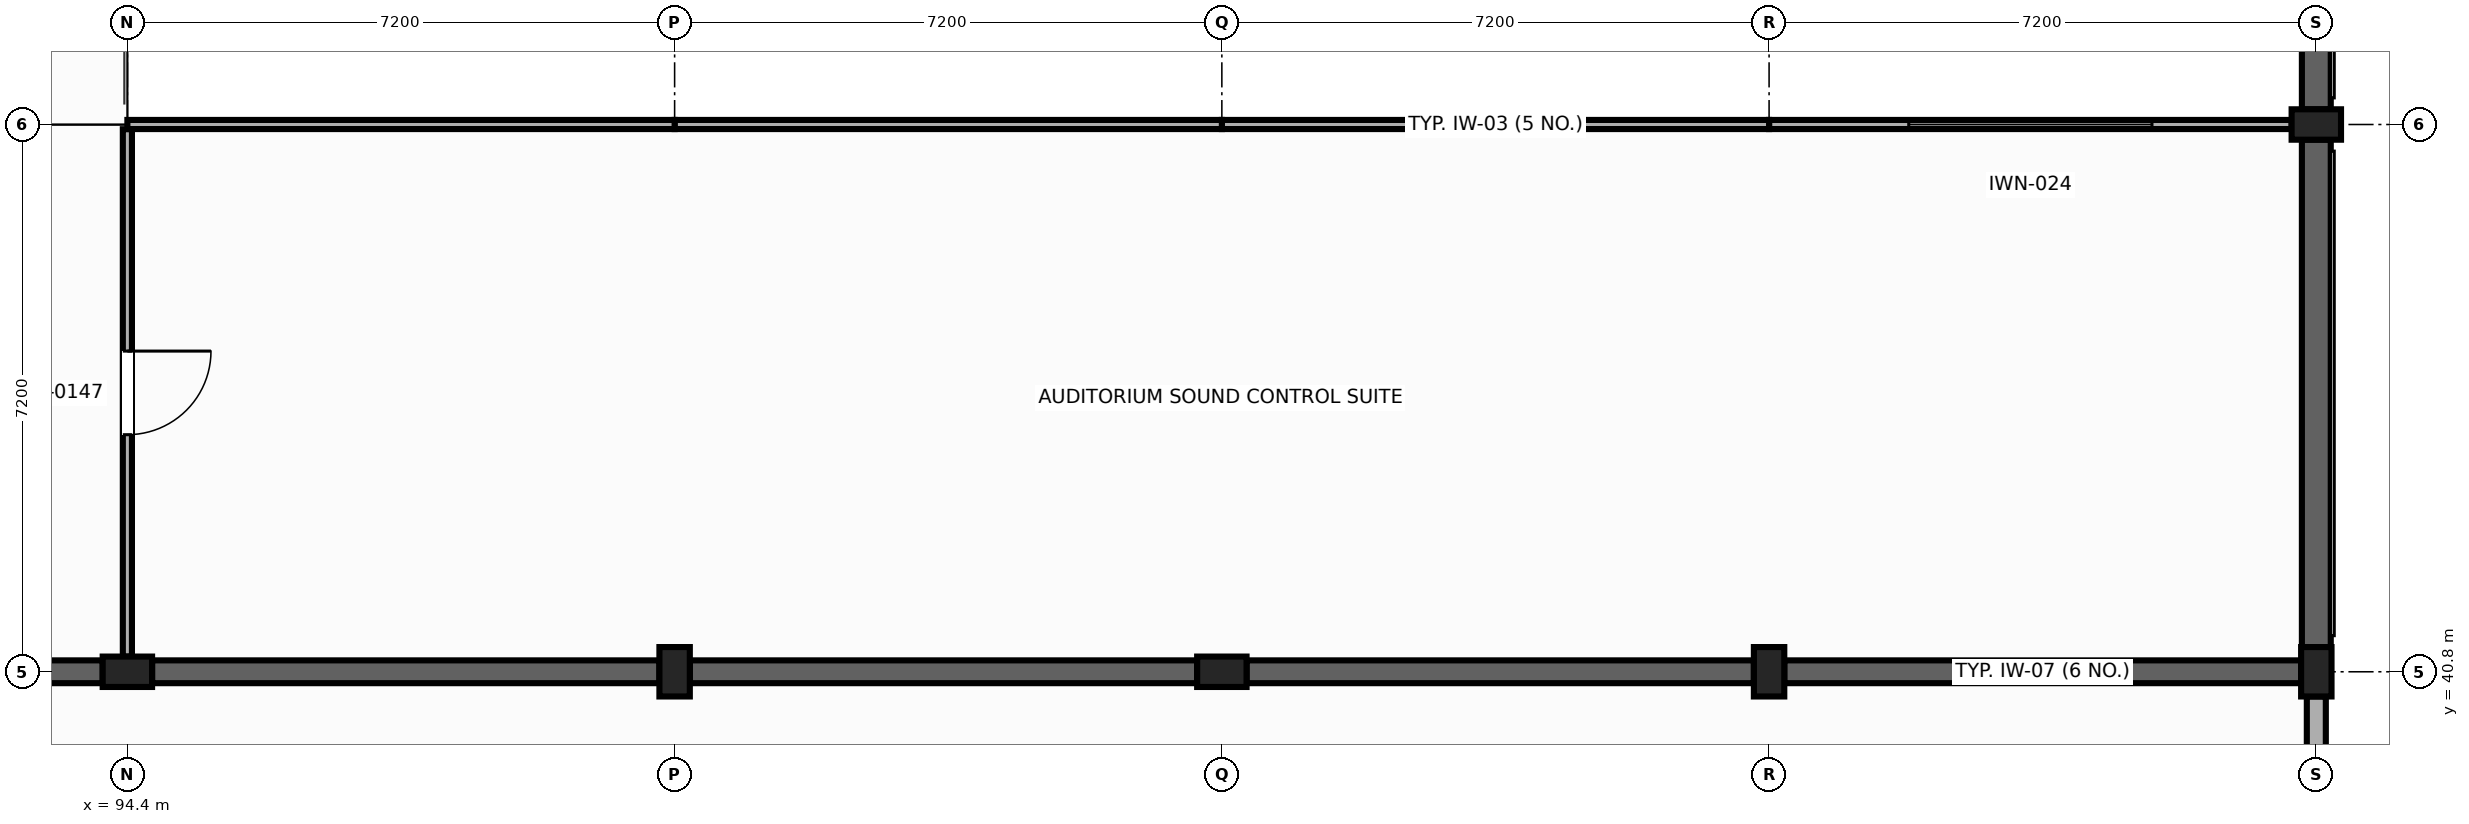
"""IFC4 building model, lengths in metres.
Left out: names, types, materials, properties, quantities, classifications, styles, units other than length and angle.
Written with IfcOpenShell. Run it as: python <this file> out.ifc"""

import sys

from ifc_helpers import new_model, si_unit, direction, frame, frame_2d, origin, origin_2d, place, context, subcontext, project, spatial, rectangle, extrude, element, fill, save


model = new_model("IFC4")
c1 = context("Model", 3, precision=1e-05, world=origin(), true_north=direction((0.0, 1.0)))
c2 = subcontext(c1, "Body", "Model", "MODEL_VIEW")
j1 = project(units=[si_unit("LENGTHUNIT", "METRE"), si_unit("PLANEANGLEUNIT", "RADIAN")], contexts=[c1])
p1 = place(None, origin())
s1 = spatial("IfcSite", under=j1, at=p1, CompositionType="ELEMENT")
p2 = place(p1, origin())
s2 = spatial("IfcBuilding", under=s1, at=p2, CompositionType="ELEMENT")
p3 = place(p2, frame((0.0, 0.0, 14.4)))
s3 = spatial("IfcBuildingStorey", under=s2, at=p3, CompositionType="ELEMENT", Elevation=14.4)
for number, where, z_axis, x_axis in (
    (1, (94.4, 40.8, 0.0), (0.0, 0.0, 1.0), (0.0, 1.0, 0.0)),
    (2, (101.6, 40.8, 0.0), (0.0, 0.0, 1.0), (1.0, 0.0, 0.0)),
    (3, (108.8, 40.8, 0.0), (0.0, 0.0, 1.0), (0.0, 1.0, 0.0)),
    (4, (116.0, 40.8, 0.0), (0.0, 0.0, 1.0), (1.0, 0.0, 0.0)),
):
    element("IfcColumn", number, at=place(p3, frame(where, z_axis=z_axis, x_axis=x_axis)), inside=s3, PredefinedType="PILASTER", context=c2, shape_type="SweptSolid", body=[
        extrude(rectangle(XDim=0.4, YDim=0.65, at=origin_2d()), origin(), (0.0, 0.0, 1.0), 4.28),
    ])
for number, where, z_axis, x_axis in (
    (5, (123.2, 40.8, 0.0), (0.0, 0.0, 1.0), (1.0, 0.0, 0.0)),
    (6, (123.2, 48.0, 0.0), (0.0, 0.0, 1.0), (0.0, 1.0, 0.0)),
):
    element("IfcColumn", number, at=place(p3, frame(where, z_axis=z_axis, x_axis=x_axis)), inside=s3, PredefinedType="PILASTER", context=c2, shape_type="SweptSolid", body=[
        extrude(rectangle(XDim=0.4, YDim=0.65, at=origin_2d()), origin(), (0.0, 0.0, 1.0), 4.5),
    ])
p4 = place(p3, frame((123.2, 40.475, 0.0), z_axis=(0.0, 0.0, 1.0), x_axis=(0.0, -1.0, 0.0)))
e7 = element("IfcWall", 7, at=p4, inside=s3, PredefinedType="SOLIDWALL", context=c2, shape_type="SweptSolid", body=[
    extrude(rectangle(XDim=6.575, YDim=0.25, at=frame_2d((3.288, 0.0))), origin(), (0.0, 0.0, 1.0), 3.575),
])
for number, where, z_axis, x_axis in (
    (8, (123.2, 54.875, 0.0), (0.0, 0.0, 1.0), (0.0, -1.0, 0.0)),
    (9, (123.2, 47.8, 0.0), (0.0, 0.0, 1.0), (0.0, -1.0, 0.0)),
):
    element("IfcWall", number, at=place(p3, frame(where, z_axis=z_axis, x_axis=x_axis)), inside=s3, PredefinedType="SHEAR", context=c2, shape_type="SweptSolid", body=[
        extrude(rectangle(XDim=6.675, YDim=0.38, at=frame_2d((3.337, 0.0))), origin(), (0.0, 0.0, 1.0), 4.5),
    ])
p5 = place(p3, frame((87.4, 40.8, 0.0), z_axis=(0.0, 0.0, 1.0), x_axis=(1.0, 0.0, 0.0)))
e10 = element("IfcWall", 10, at=p5, inside=s3, PredefinedType="SHEAR", context=c2, shape_type="SweptSolid", body=[
    extrude(rectangle(XDim=6.675, YDim=0.3, at=frame_2d((3.337, 0.0))), origin(), (0.0, 0.0, 1.0), 4.28),
])
p6 = place(p5, frame((2.788, 0.0, 0.0)))
e11 = element("IfcOpeningElement", 11, at=p6, cuts=e10, PredefinedType="OPENING", context=c2, shape_type="SweptSolid", body=[
    extrude(rectangle(XDim=1.1, YDim=2.15, at=frame_2d((0.55, 1.075))), frame((0.0, 0.16, 0.0), z_axis=(0.0, -1.0, 0.0), x_axis=(1.0, 0.0, 0.0)), (0.0, 0.0, 1.0), 0.32),
])
p7 = place(p3, frame((94.725, 40.8, 0.0), z_axis=(0.0, 0.0, 1.0), x_axis=(1.0, 0.0, 0.0)))
e12 = element("IfcWall", 12, at=p7, inside=s3, PredefinedType="SHEAR", context=c2, shape_type="SweptSolid", body=[
    extrude(rectangle(XDim=6.675, YDim=0.3, at=frame_2d((3.337, 0.0))), origin(), (0.0, 0.0, 1.0), 4.28),
])
for number, where, z_axis, x_axis in (
    (13, (101.8, 40.8, 0.0), (0.0, 0.0, 1.0), (1.0, 0.0, 0.0)),
    (14, (109.125, 40.8, 0.0), (0.0, 0.0, 1.0), (1.0, 0.0, 0.0)),
):
    element("IfcWall", number, at=place(p3, frame(where, z_axis=z_axis, x_axis=x_axis)), inside=s3, PredefinedType="SHEAR", context=c2, shape_type="SweptSolid", body=[
        extrude(rectangle(XDim=6.675, YDim=0.3, at=frame_2d((3.337, 0.0))), origin(), (0.0, 0.0, 1.0), 4.28),
    ])
p8 = place(p3, frame((116.2, 40.8, 0.0), z_axis=(0.0, 0.0, 1.0), x_axis=(1.0, 0.0, 0.0)))
e15 = element("IfcWall", 15, at=p8, inside=s3, PredefinedType="SHEAR", context=c2, shape_type="SweptSolid", body=[
    extrude(rectangle(XDim=6.8, YDim=0.3, at=frame_2d((3.4, 0.0))), origin(), (0.0, 0.0, 1.0), 4.28),
])
p9 = place(p3, frame((122.875, 48.0, 0.0), z_axis=(0.0, 0.0, 1.0), x_axis=(-1.0, 0.0, 0.0)))
e16 = element("IfcWall", 16, at=p9, inside=s3, PredefinedType="PARTITIONING", context=c2, shape_type="SweptSolid", body=[
    extrude(rectangle(XDim=6.875, YDim=0.12, at=frame_2d((3.438, 0.0))), origin(), (0.0, 0.0, 1.0), 3.814),
])
p10 = place(p9, frame((1.837, 0.0, 1.1)))
e17 = element("IfcOpeningElement", 17, at=p10, cuts=e16, PredefinedType="OPENING", context=c2, shape_type="SweptSolid", body=[
    extrude(rectangle(XDim=3.2, YDim=1.3, at=frame_2d((1.6, 0.65))), frame((0.0, 0.07, 0.0), z_axis=(0.0, -1.0, 0.0), x_axis=(1.0, 0.0, 0.0)), (0.0, 0.0, 1.0), 0.14),
])
for number, where, z_axis, x_axis in (
    (18, (116.0, 48.0, 0.0), (0.0, 0.0, 1.0), (-1.0, 0.0, 0.0)),
    (19, (108.8, 48.0, 0.0), (0.0, 0.0, 1.0), (-1.0, 0.0, 0.0)),
):
    element("IfcWall", number, at=place(p3, frame(where, z_axis=z_axis, x_axis=x_axis)), inside=s3, PredefinedType="PARTITIONING", context=c2, shape_type="SweptSolid", body=[
        extrude(rectangle(XDim=7.2, YDim=0.12, at=frame_2d((3.6, 0.0))), origin(), (0.0, 0.0, 1.0), 3.814),
    ])
p11 = place(p3, frame((101.6, 48.0, 0.0), z_axis=(0.0, 0.0, 1.0), x_axis=(-1.0, 0.0, 0.0)))
e20 = element("IfcWall", 20, at=p11, inside=s3, PredefinedType="PARTITIONING", context=c2, shape_type="SweptSolid", body=[
    extrude(rectangle(XDim=7.2, YDim=0.12, at=frame_2d((3.6, 0.0))), origin(), (0.0, 0.0, 1.0), 3.814),
])
p12 = place(p3, frame((94.4, 47.938, 0.0), z_axis=(0.0, 0.0, 1.0), x_axis=(0.0, -1.0, 0.0)))
e21 = element("IfcWall", 21, at=p12, inside=s3, PredefinedType="PARTITIONING", context=c2, shape_type="SweptSolid", body=[
    extrude(rectangle(XDim=6.938, YDim=0.12, at=frame_2d((3.469, 0.0))), origin(), (0.0, 0.0, 1.0), 4.299),
])
p13 = place(p12, frame((2.919, 0.0, 0.0)))
e22 = element("IfcOpeningElement", 22, at=p13, cuts=e21, PredefinedType="OPENING", context=c2, shape_type="SweptSolid", body=[
    extrude(rectangle(XDim=1.1, YDim=2.15, at=frame_2d((0.55, 1.075))), frame((0.0, 0.07, 0.0), z_axis=(0.0, -1.0, 0.0), x_axis=(1.0, 0.0, 0.0)), (0.0, 0.0, 1.0), 0.14),
])
p14 = place(p13, origin())
e23 = element("IfcDoor", 23, at=p14, inside=s3, OperationType="SINGLE_SWING_LEFT", PredefinedType="DOOR", context=c2, shape_type="SweptSolid", body=[
    extrude(rectangle(XDim=1.1, YDim=2.15, at=frame_2d((0.55, 1.075))), frame((0.0, 0.025, 0.0), z_axis=(0.0, -1.0, 0.0), x_axis=(1.0, 0.0, 0.0)), (0.0, 0.0, 1.0), 0.05),
])
fill(e22, e23)
p15 = place(p10, origin())
e24 = element("IfcWindow", 24, at=p15, inside=s3, PartitioningType="SINGLE_PANEL", PredefinedType="WINDOW", context=c2, shape_type="SweptSolid", body=[
    extrude(rectangle(XDim=3.2, YDim=1.3, at=frame_2d((1.6, 0.65))), frame((0.0, 0.03, 0.0), z_axis=(0.0, -1.0, 0.0), x_axis=(1.0, 0.0, 0.0)), (0.0, 0.0, 1.0), 0.06),
])
fill(e17, e24)
save(model, sys.argv[1])
